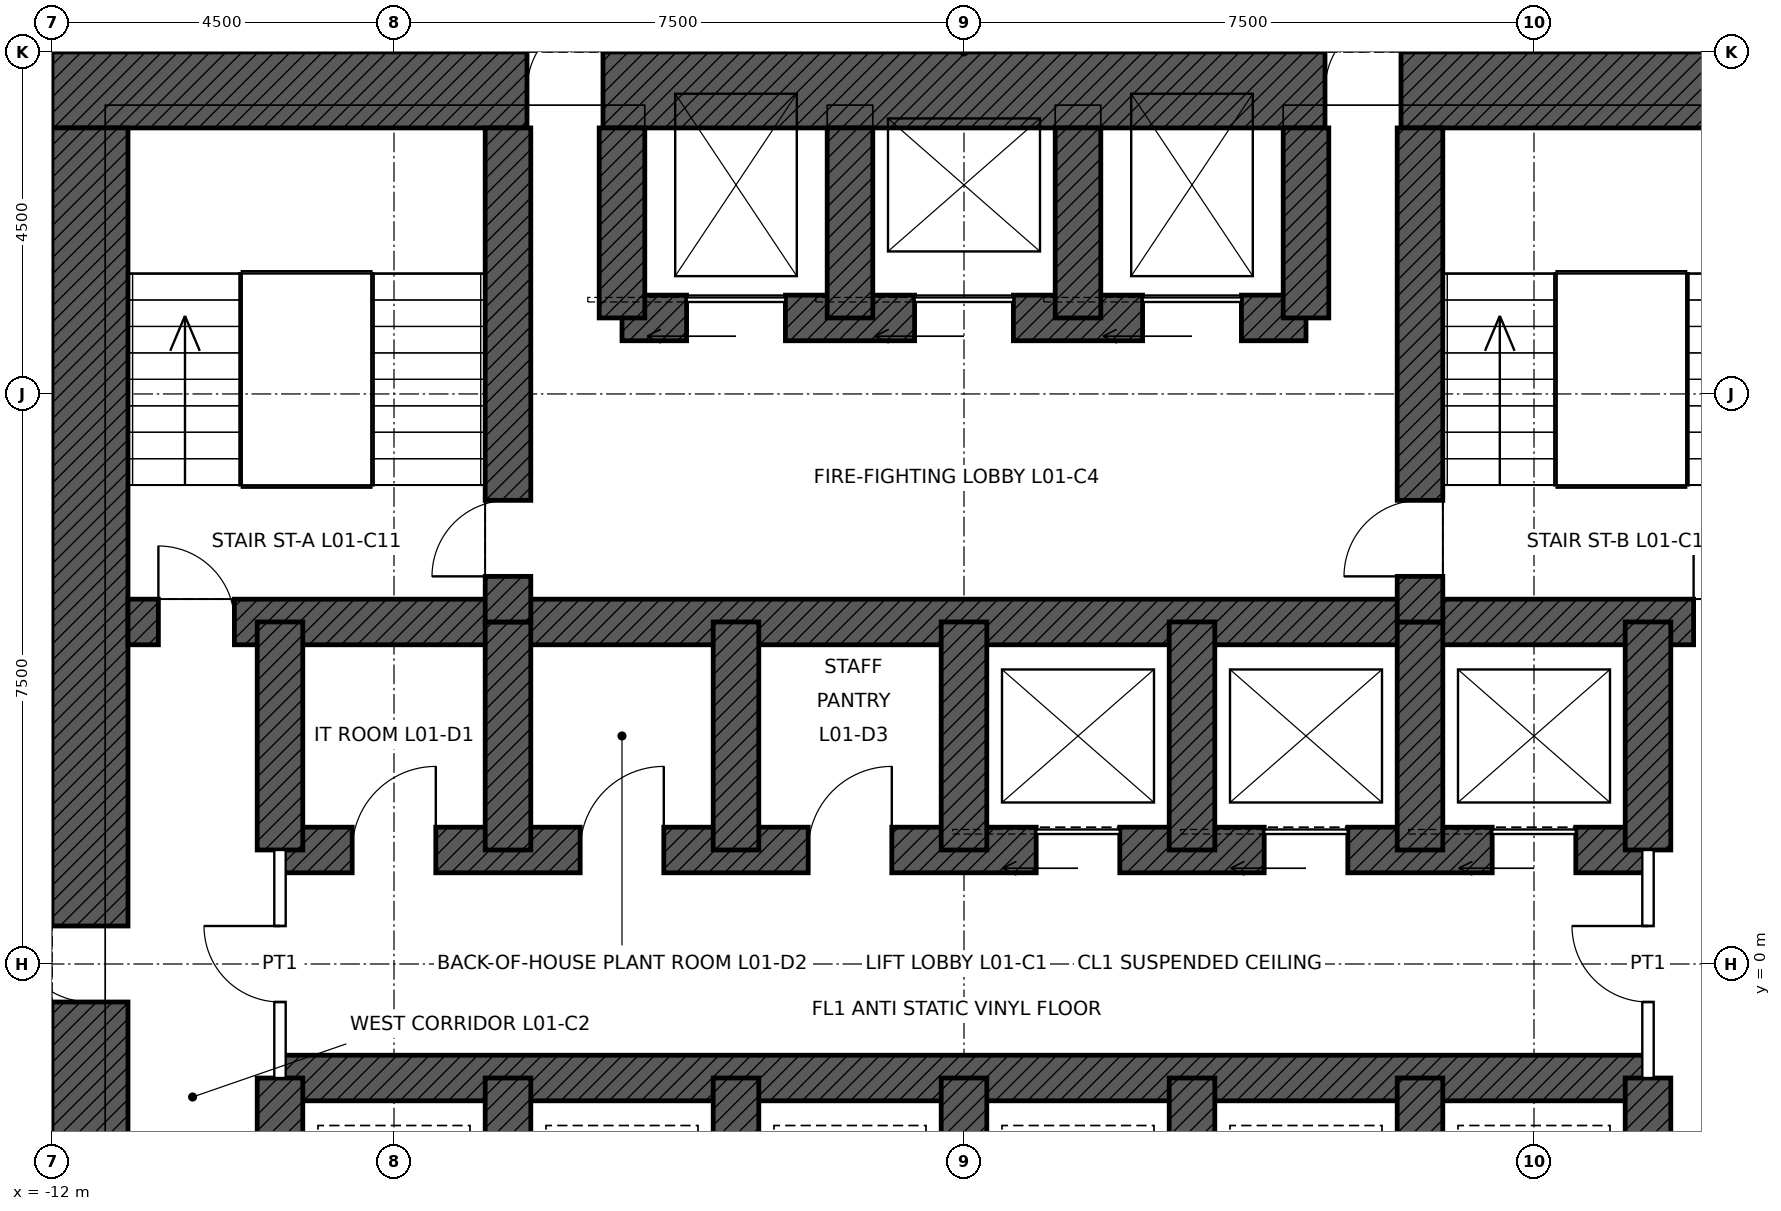
"""IFC4 building model, lengths in metres.
Left out: names, types, materials, properties, quantities, classifications, styles, units other than length and angle.
Written with IfcOpenShell. Run it as: python <this file> out.ifc"""

import sys

from ifc_helpers import new_model, si_unit, direction, frame, frame_2d, origin, place, context, subcontext, project, spatial, rectangle, extrude, element, fill, save


model = new_model("IFC4")
c1 = context("Model", 3, precision=1e-05, world=origin(), true_north=direction((0.0, 1.0)))
c2 = subcontext(c1, "Body", "Model", "MODEL_VIEW")
j1 = project(units=[si_unit("LENGTHUNIT", "METRE"), si_unit("PLANEANGLEUNIT", "RADIAN")], contexts=[c1])
p1 = place(None, origin())
s1 = spatial("IfcSite", under=j1, at=p1, CompositionType="ELEMENT")
p2 = place(p1, origin())
s2 = spatial("IfcBuilding", under=s1, at=p2, CompositionType="ELEMENT")
p3 = place(p2, frame((0.0, 0.0, 7.2)))
s3 = spatial("IfcBuildingStorey", under=s2, at=p3, CompositionType="ELEMENT", Elevation=7.2)
p4 = place(p3, frame((-12.0, 11.5, 0.0), z_axis=(0.0, 0.0, 1.0), x_axis=(1.0, 0.0, 0.0)))
e1 = element("IfcWall", 1, at=p4, inside=s3, PredefinedType="SHEAR", context=c2, shape_type="SweptSolid", body=[
    extrude(rectangle(XDim=24.0, YDim=1.0, at=frame_2d((12.0, 0.0))), origin(), (0.0, 0.0, 1.0), 5.4),
])
p5 = place(p4, frame((6.25, 0.0, 0.0)))
e2 = element("IfcOpeningElement", 2, at=p5, cuts=e1, PredefinedType="OPENING", context=c2, shape_type="SweptSolid", body=[
    extrude(rectangle(XDim=1.0, YDim=2.4, at=frame_2d((0.5, 1.2))), frame((0.0, 0.51, 0.0), z_axis=(0.0, -1.0, 0.0), x_axis=(1.0, 0.0, 0.0)), (0.0, 0.0, 1.0), 1.02),
])
p6 = place(p4, frame((16.75, 0.0, 0.0)))
e3 = element("IfcOpeningElement", 3, at=p6, cuts=e1, PredefinedType="OPENING", context=c2, shape_type="SweptSolid", body=[
    extrude(rectangle(XDim=1.0, YDim=2.4, at=frame_2d((0.5, 1.2))), frame((0.0, 0.51, 0.0), z_axis=(0.0, -1.0, 0.0), x_axis=(1.0, 0.0, 0.0)), (0.0, 0.0, 1.0), 1.02),
])
p7 = place(p3, frame((-11.5, -11.0, 0.0), z_axis=(0.0, 0.0, 1.0), x_axis=(0.0, 1.0, 0.0)))
e4 = element("IfcWall", 4, at=p7, inside=s3, PredefinedType="SHEAR", context=c2, shape_type="SweptSolid", body=[
    extrude(rectangle(XDim=22.0, YDim=1.0, at=frame_2d((11.0, 0.0))), origin(), (0.0, 0.0, 1.0), 5.4),
])
p8 = place(p7, frame((10.5, 0.0, 0.0)))
e5 = element("IfcOpeningElement", 5, at=p8, cuts=e4, PredefinedType="OPENING", context=c2, shape_type="SweptSolid", body=[
    extrude(rectangle(XDim=1.0, YDim=2.4, at=frame_2d((0.5, 1.2))), frame((0.0, 0.51, 0.0), z_axis=(0.0, -1.0, 0.0), x_axis=(1.0, 0.0, 0.0)), (0.0, 0.0, 1.0), 1.02),
])
p9 = place(p3, frame((-11.0, 4.5, 0.0), z_axis=(0.0, 0.0, 1.0), x_axis=(1.0, 0.0, 0.0)))
e6 = element("IfcWall", 6, at=p9, inside=s3, PredefinedType="SHEAR", context=c2, shape_type="SweptSolid", body=[
    extrude(rectangle(XDim=22.0, YDim=0.6, at=frame_2d((11.0, 0.0))), origin(), (0.0, 0.0, 1.0), 5.4),
])
p10 = place(p9, frame((0.4, 0.0, 0.0)))
e7 = element("IfcOpeningElement", 7, at=p10, cuts=e6, PredefinedType="OPENING", context=c2, shape_type="SweptSolid", body=[
    extrude(rectangle(XDim=1.0, YDim=2.1, at=frame_2d((0.5, 1.05))), frame((0.0, 0.31, 0.0), z_axis=(0.0, -1.0, 0.0), x_axis=(1.0, 0.0, 0.0)), (0.0, 0.0, 1.0), 0.62),
])
p11 = place(p9, frame((20.6, 0.0, 0.0)))
e8 = element("IfcOpeningElement", 8, at=p11, cuts=e6, PredefinedType="OPENING", context=c2, shape_type="SweptSolid", body=[
    extrude(rectangle(XDim=1.0, YDim=2.1, at=frame_2d((0.5, 1.05))), frame((0.0, 0.31, 0.0), z_axis=(0.0, -1.0, 0.0), x_axis=(1.0, 0.0, 0.0)), (0.0, 0.0, 1.0), 0.62),
])
p12 = place(p3, frame((-9.0, 1.5, 0.0), z_axis=(0.0, 0.0, 1.0), x_axis=(1.0, 0.0, 0.0)))
e9 = element("IfcWall", 9, at=p12, inside=s3, PredefinedType="SHEAR", context=c2, shape_type="SweptSolid", body=[
    extrude(rectangle(XDim=18.0, YDim=0.6, at=frame_2d((9.0, 0.0))), origin(), (0.0, 0.0, 1.0), 5.4),
])
p13 = place(p12, frame((9.95, 0.0, 0.0)))
e10 = element("IfcOpeningElement", 10, at=p13, cuts=e9, PredefinedType="OPENING", context=c2, shape_type="SweptSolid", body=[
    extrude(rectangle(XDim=1.1, YDim=2.1, at=frame_2d((0.55, 1.05))), frame((0.0, 0.31, 0.0), z_axis=(0.0, -1.0, 0.0), x_axis=(1.0, 0.0, 0.0)), (0.0, 0.0, 1.0), 0.62),
])
p14 = place(p12, frame((12.95, 0.0, 0.0)))
e11 = element("IfcOpeningElement", 11, at=p14, cuts=e9, PredefinedType="OPENING", context=c2, shape_type="SweptSolid", body=[
    extrude(rectangle(XDim=1.1, YDim=2.1, at=frame_2d((0.55, 1.05))), frame((0.0, 0.31, 0.0), z_axis=(0.0, -1.0, 0.0), x_axis=(1.0, 0.0, 0.0)), (0.0, 0.0, 1.0), 0.62),
])
p15 = place(p12, frame((15.95, 0.0, 0.0)))
e12 = element("IfcOpeningElement", 12, at=p15, cuts=e9, PredefinedType="OPENING", context=c2, shape_type="SweptSolid", body=[
    extrude(rectangle(XDim=1.1, YDim=2.1, at=frame_2d((0.55, 1.05))), frame((0.0, 0.31, 0.0), z_axis=(0.0, -1.0, 0.0), x_axis=(1.0, 0.0, 0.0)), (0.0, 0.0, 1.0), 0.62),
])
p16 = place(p12, frame((0.95, 0.0, 0.0)))
e13 = element("IfcOpeningElement", 13, at=p16, cuts=e9, PredefinedType="OPENING", context=c2, shape_type="SweptSolid", body=[
    extrude(rectangle(XDim=1.1, YDim=2.1, at=frame_2d((0.55, 1.05))), frame((0.0, 0.31, 0.0), z_axis=(0.0, -1.0, 0.0), x_axis=(1.0, 0.0, 0.0)), (0.0, 0.0, 1.0), 0.62),
])
p17 = place(p12, frame((3.95, 0.0, 0.0)))
e14 = element("IfcOpeningElement", 14, at=p17, cuts=e9, PredefinedType="OPENING", context=c2, shape_type="SweptSolid", body=[
    extrude(rectangle(XDim=1.1, YDim=2.1, at=frame_2d((0.55, 1.05))), frame((0.0, 0.31, 0.0), z_axis=(0.0, -1.0, 0.0), x_axis=(1.0, 0.0, 0.0)), (0.0, 0.0, 1.0), 0.62),
])
p18 = place(p12, frame((6.95, 0.0, 0.0)))
e15 = element("IfcOpeningElement", 15, at=p18, cuts=e9, PredefinedType="OPENING", context=c2, shape_type="SweptSolid", body=[
    extrude(rectangle(XDim=1.1, YDim=2.1, at=frame_2d((0.55, 1.05))), frame((0.0, 0.31, 0.0), z_axis=(0.0, -1.0, 0.0), x_axis=(1.0, 0.0, 0.0)), (0.0, 0.0, 1.0), 0.62),
])
p19 = place(p3, frame((-9.0, -1.5, 0.0), z_axis=(0.0, 0.0, 1.0), x_axis=(1.0, 0.0, 0.0)))
e16 = element("IfcWall", 16, at=p19, inside=s3, PredefinedType="SHEAR", context=c2, shape_type="SweptSolid", body=[
    extrude(rectangle(XDim=18.0, YDim=0.6, at=frame_2d((9.0, 0.0))), origin(), (0.0, 0.0, 1.0), 5.4),
])
p20 = place(p3, frame((-4.5, 8.5, 0.0), z_axis=(0.0, 0.0, 1.0), x_axis=(1.0, 0.0, 0.0)))
e17 = element("IfcWall", 17, at=p20, inside=s3, PredefinedType="SHEAR", context=c2, shape_type="SweptSolid", body=[
    extrude(rectangle(XDim=9.0, YDim=0.6, at=frame_2d((4.5, 0.0))), origin(), (0.0, 0.0, 1.0), 5.4),
])
p21 = place(p20, frame((0.85, 0.0, 0.0)))
e18 = element("IfcOpeningElement", 18, at=p21, cuts=e17, PredefinedType="OPENING", context=c2, shape_type="SweptSolid", body=[
    extrude(rectangle(XDim=1.3, YDim=2.4, at=frame_2d((0.65, 1.2))), frame((0.0, 0.31, 0.0), z_axis=(0.0, -1.0, 0.0), x_axis=(1.0, 0.0, 0.0)), (0.0, 0.0, 1.0), 0.62),
])
p22 = place(p20, frame((6.85, 0.0, 0.0)))
e19 = element("IfcOpeningElement", 19, at=p22, cuts=e17, PredefinedType="OPENING", context=c2, shape_type="SweptSolid", body=[
    extrude(rectangle(XDim=1.3, YDim=2.4, at=frame_2d((0.65, 1.2))), frame((0.0, 0.31, 0.0), z_axis=(0.0, -1.0, 0.0), x_axis=(1.0, 0.0, 0.0)), (0.0, 0.0, 1.0), 0.62),
])
p23 = place(p20, frame((3.85, 0.0, 0.0)))
e20 = element("IfcOpeningElement", 20, at=p23, cuts=e17, PredefinedType="OPENING", context=c2, shape_type="SweptSolid", body=[
    extrude(rectangle(XDim=1.3, YDim=2.4, at=frame_2d((0.65, 1.2))), frame((0.0, 0.31, 0.0), z_axis=(0.0, -1.0, 0.0), x_axis=(1.0, 0.0, 0.0)), (0.0, 0.0, 1.0), 0.62),
])
for number, where, z_axis, x_axis in (
    (21, (-9.0, 1.5, 0.0), (0.0, 0.0, 1.0), (0.0, 1.0, 0.0)),
    (22, (9.0, 1.5, 0.0), (0.0, 0.0, 1.0), (0.0, 1.0, 0.0)),
    (23, (-9.0, -4.5, 0.0), (0.0, 0.0, 1.0), (0.0, 1.0, 0.0)),
    (24, (9.0, -4.5, 0.0), (0.0, 0.0, 1.0), (0.0, 1.0, 0.0)),
    (25, (-6.0, 1.5, 0.0), (0.0, 0.0, 1.0), (0.0, 1.0, 0.0)),
    (26, (-3.0, 1.5, 0.0), (0.0, 0.0, 1.0), (0.0, 1.0, 0.0)),
    (27, (0.0, 1.5, 0.0), (0.0, 0.0, 1.0), (0.0, 1.0, 0.0)),
    (28, (3.0, 1.5, 0.0), (0.0, 0.0, 1.0), (0.0, 1.0, 0.0)),
    (29, (6.0, 1.5, 0.0), (0.0, 0.0, 1.0), (0.0, 1.0, 0.0)),
    (30, (-6.0, -4.5, 0.0), (0.0, 0.0, 1.0), (0.0, 1.0, 0.0)),
    (31, (-3.0, -4.5, 0.0), (0.0, 0.0, 1.0), (0.0, 1.0, 0.0)),
    (32, (0.0, -4.5, 0.0), (0.0, 0.0, 1.0), (0.0, 1.0, 0.0)),
    (33, (3.0, -4.5, 0.0), (0.0, 0.0, 1.0), (0.0, 1.0, 0.0)),
    (34, (6.0, -4.5, 0.0), (0.0, 0.0, 1.0), (0.0, 1.0, 0.0)),
):
    element("IfcWall", number, at=place(p3, frame(where, z_axis=z_axis, x_axis=x_axis)), inside=s3, PredefinedType="SHEAR", context=c2, shape_type="SweptSolid", body=[
        extrude(rectangle(XDim=3.0, YDim=0.6, at=frame_2d((1.5, 0.0))), origin(), (0.0, 0.0, 1.0), 5.4),
    ])
p24 = place(p3, frame((-6.0, 4.5, 0.0), z_axis=(0.0, 0.0, 1.0), x_axis=(0.0, 1.0, 0.0)))
e35 = element("IfcWall", 35, at=p24, inside=s3, PredefinedType="SHEAR", context=c2, shape_type="SweptSolid", body=[
    extrude(rectangle(XDim=6.5, YDim=0.6, at=frame_2d((3.25, 0.0))), origin(), (0.0, 0.0, 1.0), 5.4),
])
p25 = place(p24, frame((0.6, 0.0, 0.0)))
e36 = element("IfcOpeningElement", 36, at=p25, cuts=e35, PredefinedType="OPENING", context=c2, shape_type="SweptSolid", body=[
    extrude(rectangle(XDim=1.0, YDim=2.1, at=frame_2d((0.5, 1.05))), frame((0.0, 0.31, 0.0), z_axis=(0.0, -1.0, 0.0), x_axis=(1.0, 0.0, 0.0)), (0.0, 0.0, 1.0), 0.62),
])
p26 = place(p3, frame((6.0, 4.5, 0.0), z_axis=(0.0, 0.0, 1.0), x_axis=(0.0, 1.0, 0.0)))
e37 = element("IfcWall", 37, at=p26, inside=s3, PredefinedType="SHEAR", context=c2, shape_type="SweptSolid", body=[
    extrude(rectangle(XDim=6.5, YDim=0.6, at=frame_2d((3.25, 0.0))), origin(), (0.0, 0.0, 1.0), 5.4),
])
p27 = place(p26, frame((0.6, 0.0, 0.0)))
e38 = element("IfcOpeningElement", 38, at=p27, cuts=e37, PredefinedType="OPENING", context=c2, shape_type="SweptSolid", body=[
    extrude(rectangle(XDim=1.0, YDim=2.1, at=frame_2d((0.5, 1.05))), frame((0.0, 0.31, 0.0), z_axis=(0.0, -1.0, 0.0), x_axis=(1.0, 0.0, 0.0)), (0.0, 0.0, 1.0), 0.62),
])
for number, where, z_axis, x_axis in (
    (39, (-4.5, 8.5, 0.0), (0.0, 0.0, 1.0), (0.0, 1.0, 0.0)),
    (40, (4.5, 8.5, 0.0), (0.0, 0.0, 1.0), (0.0, 1.0, 0.0)),
    (41, (-1.5, 8.5, 0.0), (0.0, 0.0, 1.0), (0.0, 1.0, 0.0)),
    (42, (1.5, 8.5, 0.0), (0.0, 0.0, 1.0), (0.0, 1.0, 0.0)),
):
    element("IfcWall", number, at=place(p3, frame(where, z_axis=z_axis, x_axis=x_axis)), inside=s3, PredefinedType="SHEAR", context=c2, shape_type="SweptSolid", body=[
        extrude(rectangle(XDim=2.5, YDim=0.6, at=frame_2d((1.25, 0.0))), origin(), (0.0, 0.0, 1.0), 5.4),
    ])
p28 = place(p3, frame((-9.0, -1.5, 0.0), z_axis=(0.0, 0.0, 1.0), x_axis=(0.0, 1.0, 0.0)))
e43 = element("IfcWall", 43, at=p28, inside=s3, PredefinedType="PARTITIONING", context=c2, shape_type="SweptSolid", body=[
    extrude(rectangle(XDim=3.0, YDim=0.15, at=frame_2d((1.5, 0.0))), origin(), (0.0, 0.0, 1.0), 5.15),
])
p29 = place(p28, frame((1.0, 0.0, 0.0)))
e44 = element("IfcOpeningElement", 44, at=p29, cuts=e43, PredefinedType="OPENING", context=c2, shape_type="SweptSolid", body=[
    extrude(rectangle(XDim=1.0, YDim=2.4, at=frame_2d((0.5, 1.2))), frame((0.0, 0.085, 0.0), z_axis=(0.0, -1.0, 0.0), x_axis=(1.0, 0.0, 0.0)), (0.0, 0.0, 1.0), 0.17),
])
p30 = place(p3, frame((9.0, -1.5, 0.0), z_axis=(0.0, 0.0, 1.0), x_axis=(0.0, 1.0, 0.0)))
e45 = element("IfcWall", 45, at=p30, inside=s3, PredefinedType="PARTITIONING", context=c2, shape_type="SweptSolid", body=[
    extrude(rectangle(XDim=3.0, YDim=0.15, at=frame_2d((1.5, 0.0))), origin(), (0.0, 0.0, 1.0), 5.15),
])
p31 = place(p30, frame((1.0, 0.0, 0.0)))
e46 = element("IfcOpeningElement", 46, at=p31, cuts=e45, PredefinedType="OPENING", context=c2, shape_type="SweptSolid", body=[
    extrude(rectangle(XDim=1.0, YDim=2.4, at=frame_2d((0.5, 1.2))), frame((0.0, 0.085, 0.0), z_axis=(0.0, -1.0, 0.0), x_axis=(1.0, 0.0, 0.0)), (0.0, 0.0, 1.0), 0.17),
])
p32 = place(p10, origin())
e47 = element("IfcDoor", 47, at=p32, inside=s3, OperationType="SINGLE_SWING_LEFT", PredefinedType="DOOR", context=c2, shape_type="SweptSolid", body=[
    extrude(rectangle(XDim=1.0, YDim=2.1, at=frame_2d((0.5, 1.05))), frame((0.0, 0.025, 0.0), z_axis=(0.0, -1.0, 0.0), x_axis=(1.0, 0.0, 0.0)), (0.0, 0.0, 1.0), 0.05),
])
fill(e7, e47)
p33 = place(p11, origin())
e48 = element("IfcDoor", 48, at=p33, inside=s3, OperationType="SINGLE_SWING_LEFT", PredefinedType="DOOR", context=c2, shape_type="SweptSolid", body=[
    extrude(rectangle(XDim=1.0, YDim=2.1, at=frame_2d((0.5, 1.05))), frame((0.0, 0.025, 0.0), z_axis=(0.0, -1.0, 0.0), x_axis=(1.0, 0.0, 0.0)), (0.0, 0.0, 1.0), 0.05),
])
fill(e8, e48)
p34 = place(p25, origin())
e49 = element("IfcDoor", 49, at=p34, inside=s3, OperationType="SINGLE_SWING_LEFT", PredefinedType="DOOR", context=c2, shape_type="SweptSolid", body=[
    extrude(rectangle(XDim=1.0, YDim=2.1, at=frame_2d((0.5, 1.05))), frame((0.0, 0.025, 0.0), z_axis=(0.0, -1.0, 0.0), x_axis=(1.0, 0.0, 0.0)), (0.0, 0.0, 1.0), 0.05),
])
fill(e36, e49)
p35 = place(p27, origin())
e50 = element("IfcDoor", 50, at=p35, inside=s3, OperationType="SINGLE_SWING_LEFT", PredefinedType="DOOR", context=c2, shape_type="SweptSolid", body=[
    extrude(rectangle(XDim=1.0, YDim=2.1, at=frame_2d((0.5, 1.05))), frame((0.0, 0.025, 0.0), z_axis=(0.0, -1.0, 0.0), x_axis=(1.0, 0.0, 0.0)), (0.0, 0.0, 1.0), 0.05),
])
fill(e38, e50)
p36 = place(p5, origin())
e51 = element("IfcDoor", 51, at=p36, inside=s3, OperationType="SINGLE_SWING_RIGHT", PredefinedType="DOOR", context=c2, shape_type="SweptSolid", body=[
    extrude(rectangle(XDim=1.0, YDim=2.4, at=frame_2d((0.5, 1.2))), frame((0.0, 0.485, 0.0), z_axis=(0.0, -1.0, 0.0), x_axis=(1.0, 0.0, 0.0)), (0.0, 0.0, 1.0), 0.05),
])
fill(e2, e51)
p37 = place(p6, origin())
e52 = element("IfcDoor", 52, at=p37, inside=s3, OperationType="SINGLE_SWING_RIGHT", PredefinedType="DOOR", context=c2, shape_type="SweptSolid", body=[
    extrude(rectangle(XDim=1.0, YDim=2.4, at=frame_2d((0.5, 1.2))), frame((0.0, 0.485, 0.0), z_axis=(0.0, -1.0, 0.0), x_axis=(1.0, 0.0, 0.0)), (0.0, 0.0, 1.0), 0.05),
])
fill(e3, e52)
p38 = place(p8, origin())
e53 = element("IfcDoor", 53, at=p38, inside=s3, OperationType="SINGLE_SWING_RIGHT", PredefinedType="DOOR", context=c2, shape_type="SweptSolid", body=[
    extrude(rectangle(XDim=1.0, YDim=2.4, at=frame_2d((0.5, 1.2))), frame((0.0, 0.485, 0.0), z_axis=(0.0, -1.0, 0.0), x_axis=(1.0, 0.0, 0.0)), (0.0, 0.0, 1.0), 0.05),
])
fill(e5, e53)
p39 = place(p21, origin())
e54 = element("IfcDoor", 54, at=p39, inside=s3, OperationType="SLIDING_TO_LEFT", PredefinedType="DOOR", context=c2, shape_type="SweptSolid", body=[
    extrude(rectangle(XDim=1.3, YDim=2.4, at=frame_2d((0.65, 1.2))), frame((0.0, 0.025, 0.0), z_axis=(0.0, -1.0, 0.0), x_axis=(1.0, 0.0, 0.0)), (0.0, 0.0, 1.0), 0.05),
])
fill(e18, e54)
p40 = place(p22, origin())
e55 = element("IfcDoor", 55, at=p40, inside=s3, OperationType="SLIDING_TO_LEFT", PredefinedType="DOOR", context=c2, shape_type="SweptSolid", body=[
    extrude(rectangle(XDim=1.3, YDim=2.4, at=frame_2d((0.65, 1.2))), frame((0.0, 0.025, 0.0), z_axis=(0.0, -1.0, 0.0), x_axis=(1.0, 0.0, 0.0)), (0.0, 0.0, 1.0), 0.05),
])
fill(e19, e55)
p41 = place(p23, origin())
e56 = element("IfcDoor", 56, at=p41, inside=s3, OperationType="SLIDING_TO_LEFT", PredefinedType="DOOR", context=c2, shape_type="SweptSolid", body=[
    extrude(rectangle(XDim=1.3, YDim=2.4, at=frame_2d((0.65, 1.2))), frame((0.0, 0.025, 0.0), z_axis=(0.0, -1.0, 0.0), x_axis=(1.0, 0.0, 0.0)), (0.0, 0.0, 1.0), 0.05),
])
fill(e20, e56)
p42 = place(p13, origin())
e57 = element("IfcDoor", 57, at=p42, inside=s3, OperationType="SLIDING_TO_LEFT", PredefinedType="DOOR", context=c2, shape_type="SweptSolid", body=[
    extrude(rectangle(XDim=1.1, YDim=2.1, at=frame_2d((0.55, 1.05))), frame((0.0, 0.025, 0.0), z_axis=(0.0, -1.0, 0.0), x_axis=(1.0, 0.0, 0.0)), (0.0, 0.0, 1.0), 0.05),
])
fill(e10, e57)
p43 = place(p14, origin())
e58 = element("IfcDoor", 58, at=p43, inside=s3, OperationType="SLIDING_TO_LEFT", PredefinedType="DOOR", context=c2, shape_type="SweptSolid", body=[
    extrude(rectangle(XDim=1.1, YDim=2.1, at=frame_2d((0.55, 1.05))), frame((0.0, 0.025, 0.0), z_axis=(0.0, -1.0, 0.0), x_axis=(1.0, 0.0, 0.0)), (0.0, 0.0, 1.0), 0.05),
])
fill(e11, e58)
p44 = place(p15, origin())
e59 = element("IfcDoor", 59, at=p44, inside=s3, OperationType="SLIDING_TO_LEFT", PredefinedType="DOOR", context=c2, shape_type="SweptSolid", body=[
    extrude(rectangle(XDim=1.1, YDim=2.1, at=frame_2d((0.55, 1.05))), frame((0.0, 0.025, 0.0), z_axis=(0.0, -1.0, 0.0), x_axis=(1.0, 0.0, 0.0)), (0.0, 0.0, 1.0), 0.05),
])
fill(e12, e59)
p45 = place(p29, origin())
e60 = element("IfcDoor", 60, at=p45, inside=s3, OperationType="SINGLE_SWING_RIGHT", PredefinedType="DOOR", context=c2, shape_type="SweptSolid", body=[
    extrude(rectangle(XDim=1.0, YDim=2.4, at=frame_2d((0.5, 1.2))), frame((0.0, 0.025, 0.0), z_axis=(0.0, -1.0, 0.0), x_axis=(1.0, 0.0, 0.0)), (0.0, 0.0, 1.0), 0.05),
])
fill(e44, e60)
p46 = place(p31, origin())
e61 = element("IfcDoor", 61, at=p46, inside=s3, OperationType="SINGLE_SWING_RIGHT", PredefinedType="DOOR", context=c2, shape_type="SweptSolid", body=[
    extrude(rectangle(XDim=1.0, YDim=2.4, at=frame_2d((0.5, 1.2))), frame((0.0, 0.025, 0.0), z_axis=(0.0, -1.0, 0.0), x_axis=(1.0, 0.0, 0.0)), (0.0, 0.0, 1.0), 0.05),
])
fill(e46, e61)
p47 = place(p16, origin())
e62 = element("IfcDoor", 62, at=p47, inside=s3, OperationType="SINGLE_SWING_RIGHT", PredefinedType="DOOR", context=c2, shape_type="SweptSolid", body=[
    extrude(rectangle(XDim=1.1, YDim=2.1, at=frame_2d((0.55, 1.05))), frame((0.0, 0.025, 0.0), z_axis=(0.0, -1.0, 0.0), x_axis=(1.0, 0.0, 0.0)), (0.0, 0.0, 1.0), 0.05),
])
fill(e13, e62)
p48 = place(p17, origin())
e63 = element("IfcDoor", 63, at=p48, inside=s3, OperationType="SINGLE_SWING_RIGHT", PredefinedType="DOOR", context=c2, shape_type="SweptSolid", body=[
    extrude(rectangle(XDim=1.1, YDim=2.1, at=frame_2d((0.55, 1.05))), frame((0.0, 0.025, 0.0), z_axis=(0.0, -1.0, 0.0), x_axis=(1.0, 0.0, 0.0)), (0.0, 0.0, 1.0), 0.05),
])
fill(e14, e63)
p49 = place(p18, origin())
e64 = element("IfcDoor", 64, at=p49, inside=s3, OperationType="SINGLE_SWING_RIGHT", PredefinedType="DOOR", context=c2, shape_type="SweptSolid", body=[
    extrude(rectangle(XDim=1.1, YDim=2.1, at=frame_2d((0.55, 1.05))), frame((0.0, 0.025, 0.0), z_axis=(0.0, -1.0, 0.0), x_axis=(1.0, 0.0, 0.0)), (0.0, 0.0, 1.0), 0.05),
])
fill(e15, e64)
save(model, sys.argv[1])
